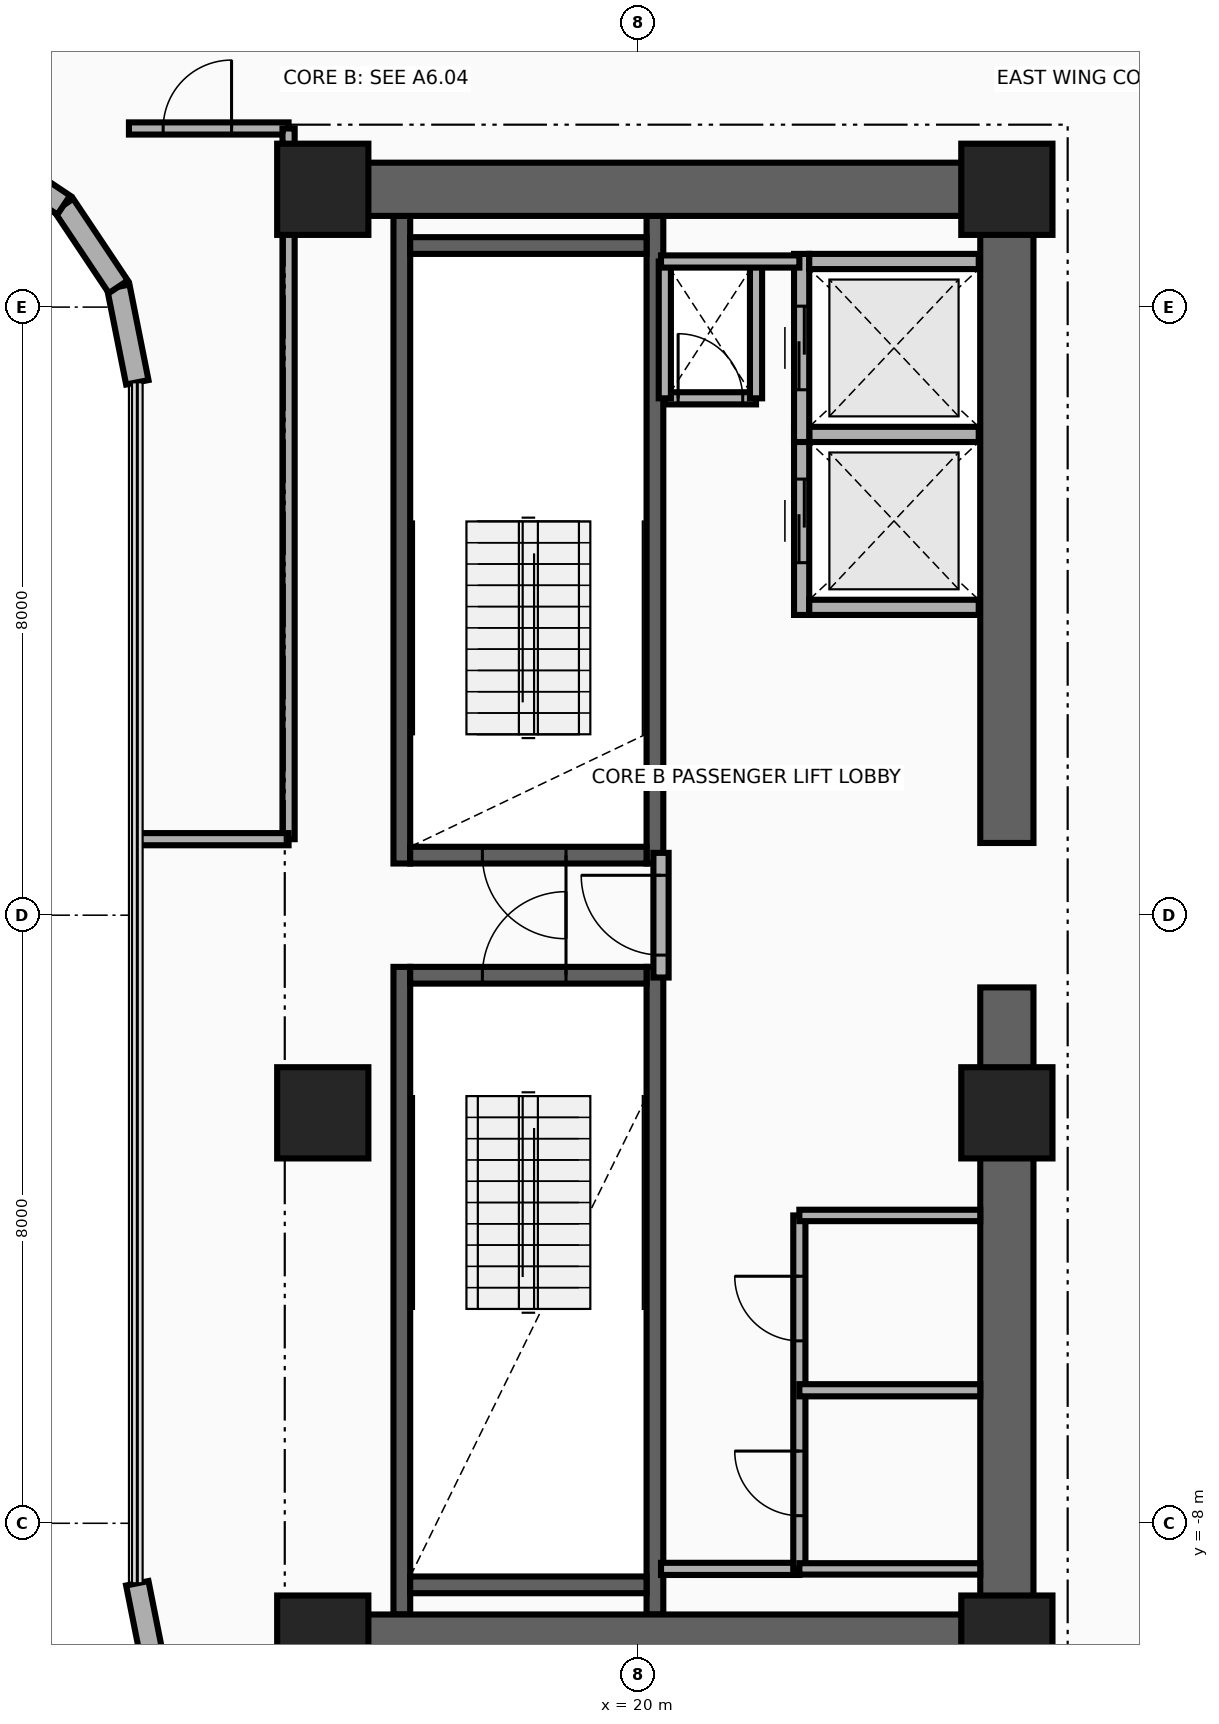
"""IFC4 building model, lengths in metres.
Left out: names, types, materials, properties, quantities, classifications, styles, units other than length and angle.
Written with IfcOpenShell. Run it as: python <this file> out.ifc"""

import sys

from ifc_helpers import new_model, si_unit, direction, frame, frame_2d, origin, origin_2d, place, context, subcontext, project, spatial, rectangle, extrude, source, transform, mapped, element, fill, save


model = new_model("IFC4")
c1 = context("Model", 3, precision=1e-05, world=origin(), true_north=direction((0.0, 1.0)))
c2 = subcontext(c1, "Body", "Model", "MODEL_VIEW")
j1 = project(units=[si_unit("LENGTHUNIT", "METRE"), si_unit("PLANEANGLEUNIT", "RADIAN")], contexts=[c1])
p1 = place(None, origin())
s1 = spatial("IfcSite", under=j1, at=p1, CompositionType="ELEMENT")
p2 = place(p1, origin())
s2 = spatial("IfcBuilding", under=s1, at=p2, CompositionType="ELEMENT")
p3 = place(p2, frame((0.0, 0.0, 124.2)))
s3 = spatial("IfcBuildingStorey", under=s2, at=p3, CompositionType="ELEMENT", Elevation=124.2)
for number, where, z_axis, x_axis in (
    (1, (16.89, 0.68, 0.0), (0.0, 0.0, 1.0), (0.0, 1.0, 0.0)),
    (2, (20.22, 0.68, 0.0), (0.0, 0.0, 1.0), (0.0, 1.0, 0.0)),
):
    element("IfcWall", number, at=place(p3, frame(where, z_axis=z_axis, x_axis=x_axis)), inside=s3, PredefinedType="SHEAR", context=c2, shape_type="SweptSolid", body=[
        extrude(rectangle(XDim=8.52, YDim=0.22, at=frame_2d((4.26, 0.0))), origin(), (0.0, 0.0, 1.0), 3.46),
    ])
p4 = place(p3, frame((17.0, 0.79, 0.0), z_axis=(0.0, 0.0, 1.0), x_axis=(1.0, 0.0, 0.0)))
e3 = element("IfcWall", 3, at=p4, inside=s3, PredefinedType="SHEAR", context=c2, shape_type="SweptSolid", body=[
    extrude(rectangle(XDim=3.11, YDim=0.22, at=frame_2d((1.555, 0.0))), origin(), (0.0, 0.0, 1.0), 3.46),
])
p5 = place(p4, frame((0.95, 0.0, 0.0)))
e4 = element("IfcOpeningElement", 4, at=p5, cuts=e3, PredefinedType="OPENING", context=c2, shape_type="SweptSolid", body=[
    extrude(rectangle(XDim=1.1, YDim=2.15, at=frame_2d((0.55, 1.075))), frame((0.0, 0.125, 0.0), z_axis=(0.0, -1.0, 0.0), x_axis=(1.0, 0.0, 0.0)), (0.0, 0.0, 1.0), 0.25),
])
p6 = place(p3, frame((17.0, 8.81, 0.0), z_axis=(0.0, 0.0, 1.0), x_axis=(1.0, 0.0, 0.0)))
e5 = element("IfcWall", 5, at=p6, inside=s3, PredefinedType="SHEAR", context=c2, shape_type="SweptSolid", body=[
    extrude(rectangle(XDim=3.11, YDim=0.22, at=frame_2d((1.555, 0.0))), origin(), (0.0, 0.0, 1.0), 3.46),
])
for number, where, z_axis, x_axis in (
    (6, (16.89, -9.2, 0.0), (0.0, 0.0, 1.0), (0.0, 1.0, 0.0)),
    (7, (20.22, -9.2, 0.0), (0.0, 0.0, 1.0), (0.0, 1.0, 0.0)),
):
    element("IfcWall", number, at=place(p3, frame(where, z_axis=z_axis, x_axis=x_axis)), inside=s3, PredefinedType="SHEAR", context=c2, shape_type="SweptSolid", body=[
        extrude(rectangle(XDim=8.52, YDim=0.22, at=frame_2d((4.26, 0.0))), origin(), (0.0, 0.0, 1.0), 3.46),
    ])
p7 = place(p3, frame((17.0, -8.81, 0.0), z_axis=(0.0, 0.0, 1.0), x_axis=(1.0, 0.0, 0.0)))
e8 = element("IfcWall", 8, at=p7, inside=s3, PredefinedType="SHEAR", context=c2, shape_type="SweptSolid", body=[
    extrude(rectangle(XDim=3.11, YDim=0.22, at=frame_2d((1.555, 0.0))), origin(), (0.0, 0.0, 1.0), 3.46),
])
p8 = place(p3, frame((17.0, -0.79, 0.0), z_axis=(0.0, 0.0, 1.0), x_axis=(1.0, 0.0, 0.0)))
e9 = element("IfcWall", 9, at=p8, inside=s3, PredefinedType="SHEAR", context=c2, shape_type="SweptSolid", body=[
    extrude(rectangle(XDim=3.11, YDim=0.22, at=frame_2d((1.555, 0.0))), origin(), (0.0, 0.0, 1.0), 3.46),
])
p9 = place(p8, frame((0.95, 0.0, 0.0)))
e10 = element("IfcOpeningElement", 10, at=p9, cuts=e9, PredefinedType="OPENING", context=c2, shape_type="SweptSolid", body=[
    extrude(rectangle(XDim=1.1, YDim=2.15, at=frame_2d((0.55, 1.075))), frame((0.0, 0.125, 0.0), z_axis=(0.0, -1.0, 0.0), x_axis=(1.0, 0.0, 0.0)), (0.0, 0.0, 1.0), 0.25),
])
for number, where, z_axis, x_axis in (
    (11, (24.85, -9.9, 0.0), (0.0, 0.0, 1.0), (0.0, 1.0, 0.0)),
    (12, (24.85, 0.95, 0.0), (0.0, 0.0, 1.0), (0.0, 1.0, 0.0)),
):
    element("IfcWall", number, at=place(p3, frame(where, z_axis=z_axis, x_axis=x_axis)), inside=s3, PredefinedType="SHEAR", context=c2, shape_type="SweptSolid", body=[
        extrude(rectangle(XDim=8.95, YDim=0.7, at=frame_2d((4.475, 0.0))), origin(), (0.0, 0.0, 1.0), 3.46),
    ])
for number, where, z_axis, x_axis in (
    (13, (15.85, 9.55, 0.0), (0.0, 0.0, 1.0), (1.0, 0.0, 0.0)),
    (14, (15.85, -9.55, 0.0), (0.0, 0.0, 1.0), (1.0, 0.0, 0.0)),
):
    element("IfcWall", number, at=place(p3, frame(where, z_axis=z_axis, x_axis=x_axis)), inside=s3, PredefinedType="SHEAR", context=c2, shape_type="SweptSolid", body=[
        extrude(rectangle(XDim=9.0, YDim=0.7, at=frame_2d((4.5, 0.0))), origin(), (0.0, 0.0, 1.0), 3.46),
    ])
m1 = source(origin(), c2, "Body", "SweptSolid", [
    extrude(rectangle(XDim=1.2, YDim=1.2, at=origin_2d()), origin(), (0.0, 0.0, 1.0), 3.7),
])
for number, where, z_axis, x_axis in (
    (15, (15.85, -9.55, 0.0), (0.0, 0.0, 1.0), (1.0, 0.0, 0.0)),
    (16, (24.85, -9.55, 0.0), (0.0, 0.0, 1.0), (1.0, 0.0, 0.0)),
    (17, (15.85, -2.6, 0.0), (0.0, 0.0, 1.0), (1.0, 0.0, 0.0)),
    (18, (24.85, -2.6, 0.0), (0.0, 0.0, 1.0), (1.0, 0.0, 0.0)),
    (19, (15.85, 9.55, 0.0), (0.0, 0.0, 1.0), (1.0, 0.0, 0.0)),
    (20, (24.85, 9.55, 0.0), (0.0, 0.0, 1.0), (1.0, 0.0, 0.0)),
):
    element("IfcColumn", number, at=place(p3, frame(where, z_axis=z_axis, x_axis=x_axis)), inside=s3, PredefinedType="COLUMN", context=c2, shape_type="MappedRepresentation", body=[
        mapped(m1, transform((0.0, 0.0, 0.0), x_axis=(1.0, 0.0, 0.0), y_axis=(0.0, 1.0, 0.0), z_axis=(0.0, 0.0, 1.0), scale=1.0)),
    ])
p10 = place(p3, frame((13.647, -9.982, 0.0), z_axis=(0.0, 0.0, 1.0), x_axis=(-0.195189223115, 0.980765602568, 0.0)))
e21 = element("IfcWall", 21, at=p10, inside=s3, PredefinedType="SOLIDWALL", context=c2, shape_type="SweptSolid", body=[
    extrude(rectangle(XDim=1.216, YDim=0.3, at=frame_2d((0.608, 0.0))), origin(), (0.0, 0.0, 1.0), 3.46),
])
p11 = place(p3, frame((13.41, 7.011, 0.0), z_axis=(0.0, 0.0, 1.0), x_axis=(-0.195090163074, 0.980785312019, 0.0)))
e22 = element("IfcWall", 22, at=p11, inside=s3, PredefinedType="SOLIDWALL", context=c2, shape_type="SweptSolid", body=[
    extrude(rectangle(XDim=1.281, YDim=0.3, at=frame_2d((0.641, 0.0))), origin(), (0.0, 0.0, 1.0), 3.46),
])
for number, where, z_axis, x_axis in (
    (23, (13.16, 8.268, 0.0), (0.0, 0.0, 1.0), (-0.556, 0.831, 0.0)),
    (24, (12.442, 9.342, 0.0), (0.0, 0.0, 1.0), (-0.831, 0.556, 0.0)),
):
    element("IfcWall", number, at=place(p3, frame(where, z_axis=z_axis, x_axis=x_axis)), inside=s3, PredefinedType="SOLIDWALL", context=c2, shape_type="SweptSolid", body=[
        extrude(rectangle(XDim=1.292, YDim=0.3, at=frame_2d((0.646, 0.0))), origin(), (0.0, 0.0, 1.0), 3.46),
    ])
p12 = place(p3, frame((22.15, 3.95, 0.0), z_axis=(0.0, 0.0, 1.0), x_axis=(0.0, 1.0, 0.0)))
e25 = element("IfcWall", 25, at=p12, inside=s3, PredefinedType="MOVABLE", context=c2, shape_type="SweptSolid", body=[
    extrude(rectangle(XDim=2.475, YDim=0.2, at=frame_2d((1.238, 0.0))), origin(), (0.0, 0.0, 1.0), 3.46),
])
p13 = place(p12, frame((0.688, 0.0, 0.0)))
e26 = element("IfcOpeningElement", 26, at=p13, cuts=e25, PredefinedType="OPENING", context=c2, shape_type="SweptSolid", body=[
    extrude(rectangle(XDim=1.1, YDim=2.1, at=frame_2d((0.55, 1.05))), frame((0.0, 0.115, 0.0), z_axis=(0.0, -1.0, 0.0), x_axis=(1.0, 0.0, 0.0)), (0.0, 0.0, 1.0), 0.23),
])
for number, where, z_axis, x_axis in (
    (27, (22.25, 4.05, 0.0), (0.0, 0.0, 1.0), (1.0, 0.0, 0.0)),
    (28, (22.25, 6.325, 0.0), (0.0, 0.0, 1.0), (1.0, 0.0, 0.0)),
):
    element("IfcWall", number, at=place(p3, frame(where, z_axis=z_axis, x_axis=x_axis)), inside=s3, PredefinedType="MOVABLE", context=c2, shape_type="SweptSolid", body=[
        extrude(rectangle(XDim=2.23, YDim=0.2, at=frame_2d((1.115, 0.0))), origin(), (0.0, 0.0, 1.0), 2.245),
    ])
p14 = place(p3, frame((22.15, 6.225, 0.0), z_axis=(0.0, 0.0, 1.0), x_axis=(0.0, 1.0, 0.0)))
e29 = element("IfcWall", 29, at=p14, inside=s3, PredefinedType="MOVABLE", context=c2, shape_type="SweptSolid", body=[
    extrude(rectangle(XDim=2.475, YDim=0.2, at=frame_2d((1.237, 0.0))), origin(), (0.0, 0.0, 1.0), 3.46),
])
p15 = place(p14, frame((0.688, 0.0, 0.0)))
e30 = element("IfcOpeningElement", 30, at=p15, cuts=e29, PredefinedType="OPENING", context=c2, shape_type="SweptSolid", body=[
    extrude(rectangle(XDim=1.1, YDim=2.1, at=frame_2d((0.55, 1.05))), frame((0.0, 0.115, 0.0), z_axis=(0.0, -1.0, 0.0), x_axis=(1.0, 0.0, 0.0)), (0.0, 0.0, 1.0), 0.23),
])
p16 = place(p3, frame((22.25, 8.6, 0.0), z_axis=(0.0, 0.0, 1.0), x_axis=(1.0, 0.0, 0.0)))
e31 = element("IfcWall", 31, at=p16, inside=s3, PredefinedType="MOVABLE", context=c2, shape_type="SweptSolid", body=[
    extrude(rectangle(XDim=2.23, YDim=0.2, at=frame_2d((1.115, 0.0))), origin(), (0.0, 0.0, 1.0), 2.245),
])
p17 = place(p3, frame((20.3, -0.82, 0.0), z_axis=(0.0, 0.0, 1.0), x_axis=(0.0, 1.0, 0.0)))
e32 = element("IfcWall", 32, at=p17, inside=s3, PredefinedType="PARTITIONING", context=c2, shape_type="SweptSolid", body=[
    extrude(rectangle(XDim=1.64, YDim=0.2, at=frame_2d((0.82, 0.0))), origin(), (0.0, 0.0, 1.0), 3.46),
])
p18 = place(p17, frame((0.295, 0.0, 0.0)))
e33 = element("IfcOpeningElement", 33, at=p18, cuts=e32, PredefinedType="OPENING", context=c2, shape_type="SweptSolid", body=[
    extrude(rectangle(XDim=1.05, YDim=2.15, at=frame_2d((0.525, 1.075))), frame((0.0, 0.115, 0.0), z_axis=(0.0, -1.0, 0.0), x_axis=(1.0, 0.0, 0.0)), (0.0, 0.0, 1.0), 0.23),
])
p19 = place(p3, frame((20.35, 6.8, 0.0), z_axis=(0.0, 0.0, 1.0), x_axis=(1.0, 0.0, 0.0)))
e34 = element("IfcWall", 34, at=p19, inside=s3, PredefinedType="PARTITIONING", context=c2, shape_type="SweptSolid", body=[
    extrude(rectangle(XDim=1.2, YDim=0.16, at=frame_2d((0.6, 0.0))), origin(), (0.0, 0.0, 1.0), 3.46),
])
p20 = place(p19, frame((0.175, 0.0, 0.0)))
e35 = element("IfcOpeningElement", 35, at=p20, cuts=e34, PredefinedType="OPENING", context=c2, shape_type="SweptSolid", body=[
    extrude(rectangle(XDim=0.85, YDim=2.05, at=frame_2d((0.425, 1.025))), frame((0.0, 0.095, 0.0), z_axis=(0.0, -1.0, 0.0), x_axis=(1.0, 0.0, 0.0)), (0.0, 0.0, 1.0), 0.19),
])
for number, where, z_axis, x_axis in (
    (36, (21.55, 6.8, 0.0), (0.0, 0.0, 1.0), (0.0, 1.0, 0.0)),
    (37, (20.35, 6.8, 0.0), (0.0, 0.0, 1.0), (0.0, 1.0, 0.0)),
):
    element("IfcWall", number, at=place(p3, frame(where, z_axis=z_axis, x_axis=x_axis)), inside=s3, PredefinedType="PARTITIONING", context=c2, shape_type="SweptSolid", body=[
        extrude(rectangle(XDim=1.8, YDim=0.16, at=frame_2d((0.9, 0.0))), origin(), (0.0, 0.0, 1.0), 3.46),
    ])
for number, where, z_axis, x_axis in (
    (38, (20.3, -8.6, 0.0), (0.0, 0.0, 1.0), (1.0, 0.0, 0.0)),
    (39, (20.3, 8.6, 0.0), (0.0, 0.0, 1.0), (1.0, 0.0, 0.0)),
):
    element("IfcWall", number, at=place(p3, frame(where, z_axis=z_axis, x_axis=x_axis)), inside=s3, PredefinedType="PARTITIONING", context=c2, shape_type="SweptSolid", body=[
        extrude(rectangle(XDim=1.82, YDim=0.16, at=frame_2d((0.91, 0.0))), origin(), (0.0, 0.0, 1.0), 3.46),
    ])
p21 = place(p3, frame((22.12, -8.6, 0.0), z_axis=(0.0, 0.0, 1.0), x_axis=(0.0, 1.0, 0.0)))
e40 = element("IfcWall", 40, at=p21, inside=s3, PredefinedType="PARTITIONING", context=c2, shape_type="SweptSolid", body=[
    extrude(rectangle(XDim=4.65, YDim=0.16, at=frame_2d((2.325, 0.0))), origin(), (0.0, 0.0, 1.0), 3.46),
])
p22 = place(p21, frame((0.7, 0.0, 0.0)))
e41 = element("IfcOpeningElement", 41, at=p22, cuts=e40, PredefinedType="OPENING", context=c2, shape_type="SweptSolid", body=[
    extrude(rectangle(XDim=0.85, YDim=2.05, at=frame_2d((0.425, 1.025))), frame((0.0, 0.095, 0.0), z_axis=(0.0, -1.0, 0.0), x_axis=(1.0, 0.0, 0.0)), (0.0, 0.0, 1.0), 0.19),
])
p23 = place(p21, frame((3.0, 0.0, 0.0)))
e42 = element("IfcOpeningElement", 42, at=p23, cuts=e40, PredefinedType="OPENING", context=c2, shape_type="SweptSolid", body=[
    extrude(rectangle(XDim=0.85, YDim=2.05, at=frame_2d((0.425, 1.025))), frame((0.0, 0.095, 0.0), z_axis=(0.0, -1.0, 0.0), x_axis=(1.0, 0.0, 0.0)), (0.0, 0.0, 1.0), 0.19),
])
for number, where, z_axis, x_axis in (
    (43, (22.12, -3.95, 0.0), (0.0, 0.0, 1.0), (1.0, 0.0, 0.0)),
    (44, (22.12, -8.6, 0.0), (0.0, 0.0, 1.0), (1.0, 0.0, 0.0)),
):
    element("IfcWall", number, at=place(p3, frame(where, z_axis=z_axis, x_axis=x_axis)), inside=s3, PredefinedType="PARTITIONING", context=c2, shape_type="SweptSolid", body=[
        extrude(rectangle(XDim=2.38, YDim=0.15, at=frame_2d((1.19, 0.0))), origin(), (0.0, 0.0, 1.0), 3.46),
    ])
p24 = place(p3, frame((22.12, -6.25, 0.0), z_axis=(0.0, 0.0, 1.0), x_axis=(1.0, 0.0, 0.0)))
e45 = element("IfcWall", 45, at=p24, inside=s3, PredefinedType="PARTITIONING", context=c2, shape_type="SweptSolid", body=[
    extrude(rectangle(XDim=2.38, YDim=0.16, at=frame_2d((1.19, 0.0))), origin(), (0.0, 0.0, 1.0), 3.46),
])
p25 = place(p3, frame((13.3, 10.35, 0.0), z_axis=(0.0, 0.0, 1.0), x_axis=(1.0, 0.0, 0.0)))
e46 = element("IfcWall", 46, at=p25, inside=s3, PredefinedType="PARTITIONING", context=c2, shape_type="SweptSolid", body=[
    extrude(rectangle(XDim=2.1, YDim=0.16, at=frame_2d((1.05, 0.0))), origin(), (0.0, 0.0, 1.0), 2.666),
])
p26 = place(p25, frame((0.45, 0.0, 0.0)))
e47 = element("IfcOpeningElement", 47, at=p26, cuts=e46, PredefinedType="OPENING", context=c2, shape_type="SweptSolid", body=[
    extrude(rectangle(XDim=0.9, YDim=2.1, at=frame_2d((0.45, 1.05))), frame((0.0, 0.095, 0.0), z_axis=(0.0, -1.0, 0.0), x_axis=(1.0, 0.0, 0.0)), (0.0, 0.0, 1.0), 0.19),
])
p27 = place(p3, frame((15.4, 1.0, 0.0), z_axis=(0.0, 0.0, 1.0), x_axis=(0.0, 1.0, 0.0)))
e48 = element("IfcWall", 48, at=p27, inside=s3, PredefinedType="PARTITIONING", context=c2, shape_type="SweptSolid", body=[
    extrude(rectangle(XDim=9.35, YDim=0.16, at=frame_2d((4.675, 0.0))), origin(), (0.0, 0.0, 1.0), 2.245),
])
p28 = place(p3, frame((13.41, 1.0, 0.0), z_axis=(0.0, 0.0, 1.0), x_axis=(1.0, 0.0, 0.0)))
e49 = element("IfcWall", 49, at=p28, inside=s3, PredefinedType="PARTITIONING", context=c2, shape_type="SweptSolid", body=[
    extrude(rectangle(XDim=1.99, YDim=0.16, at=frame_2d((0.995, 0.0))), origin(), (0.0, 0.0, 1.0), 2.245),
])
p29 = place(p13, origin())
e50 = element("IfcDoor", 50, at=p29, inside=s3, OperationType="DOUBLE_DOOR_SLIDING", PredefinedType="DOOR", context=c2, shape_type="SweptSolid", body=[
    extrude(rectangle(XDim=1.1, YDim=2.1, at=frame_2d((0.55, 1.05))), frame((0.0, 0.025, 0.0), z_axis=(0.0, -1.0, 0.0), x_axis=(1.0, 0.0, 0.0)), (0.0, 0.0, 1.0), 0.05),
])
fill(e26, e50)
p30 = place(p15, origin())
e51 = element("IfcDoor", 51, at=p30, inside=s3, OperationType="DOUBLE_DOOR_SLIDING", PredefinedType="DOOR", context=c2, shape_type="SweptSolid", body=[
    extrude(rectangle(XDim=1.1, YDim=2.1, at=frame_2d((0.55, 1.05))), frame((0.0, 0.025, 0.0), z_axis=(0.0, -1.0, 0.0), x_axis=(1.0, 0.0, 0.0)), (0.0, 0.0, 1.0), 0.05),
])
fill(e30, e51)
p31 = place(p18, origin())
e52 = element("IfcDoor", 52, at=p31, inside=s3, OperationType="SINGLE_SWING_RIGHT", PredefinedType="DOOR", context=c2, shape_type="SweptSolid", body=[
    extrude(rectangle(XDim=1.05, YDim=2.15, at=frame_2d((0.525, 1.075))), frame((0.0, 0.025, 0.0), z_axis=(0.0, -1.0, 0.0), x_axis=(1.0, 0.0, 0.0)), (0.0, 0.0, 1.0), 0.05),
])
fill(e33, e52)
p32 = place(p5, frame((1.1, 0.0, 0.0), z_axis=(0.0, 0.0, 1.0), x_axis=(-1.0, 0.0, 0.0)))
e53 = element("IfcDoor", 53, at=p32, inside=s3, OperationType="SINGLE_SWING_LEFT", PredefinedType="DOOR", context=c2, shape_type="SweptSolid", body=[
    extrude(rectangle(XDim=1.1, YDim=2.15, at=frame_2d((0.55, 1.075))), frame((0.0, 0.025, 0.0), z_axis=(0.0, -1.0, 0.0), x_axis=(1.0, 0.0, 0.0)), (0.0, 0.0, 1.0), 0.05),
])
fill(e4, e53)
p33 = place(p9, origin())
e54 = element("IfcDoor", 54, at=p33, inside=s3, OperationType="SINGLE_SWING_RIGHT", PredefinedType="DOOR", context=c2, shape_type="SweptSolid", body=[
    extrude(rectangle(XDim=1.1, YDim=2.15, at=frame_2d((0.55, 1.075))), frame((0.0, 0.025, 0.0), z_axis=(0.0, -1.0, 0.0), x_axis=(1.0, 0.0, 0.0)), (0.0, 0.0, 1.0), 0.05),
])
fill(e10, e54)
p34 = place(p20, origin())
e55 = element("IfcDoor", 55, at=p34, inside=s3, OperationType="SINGLE_SWING_LEFT", PredefinedType="DOOR", context=c2, shape_type="SweptSolid", body=[
    extrude(rectangle(XDim=0.85, YDim=2.05, at=frame_2d((0.425, 1.025))), frame((0.0, 0.025, 0.0), z_axis=(0.0, -1.0, 0.0), x_axis=(1.0, 0.0, 0.0)), (0.0, 0.0, 1.0), 0.05),
])
fill(e35, e55)
p35 = place(p22, origin())
e56 = element("IfcDoor", 56, at=p35, inside=s3, OperationType="SINGLE_SWING_RIGHT", PredefinedType="DOOR", context=c2, shape_type="SweptSolid", body=[
    extrude(rectangle(XDim=0.85, YDim=2.05, at=frame_2d((0.425, 1.025))), frame((0.0, 0.025, 0.0), z_axis=(0.0, -1.0, 0.0), x_axis=(1.0, 0.0, 0.0)), (0.0, 0.0, 1.0), 0.05),
])
fill(e41, e56)
p36 = place(p23, origin())
e57 = element("IfcDoor", 57, at=p36, inside=s3, OperationType="SINGLE_SWING_LEFT", PredefinedType="DOOR", context=c2, shape_type="SweptSolid", body=[
    extrude(rectangle(XDim=0.85, YDim=2.05, at=frame_2d((0.425, 1.025))), frame((0.0, 0.025, 0.0), z_axis=(0.0, -1.0, 0.0), x_axis=(1.0, 0.0, 0.0)), (0.0, 0.0, 1.0), 0.05),
])
fill(e42, e57)
p37 = place(p26, origin())
e58 = element("IfcDoor", 58, at=p37, inside=s3, OperationType="SINGLE_SWING_RIGHT", PredefinedType="DOOR", context=c2, shape_type="SweptSolid", body=[
    extrude(rectangle(XDim=0.9, YDim=2.1, at=frame_2d((0.45, 1.05))), frame((0.0, 0.025, 0.0), z_axis=(0.0, -1.0, 0.0), x_axis=(1.0, 0.0, 0.0)), (0.0, 0.0, 1.0), 0.05),
])
fill(e47, e58)
save(model, sys.argv[1])
